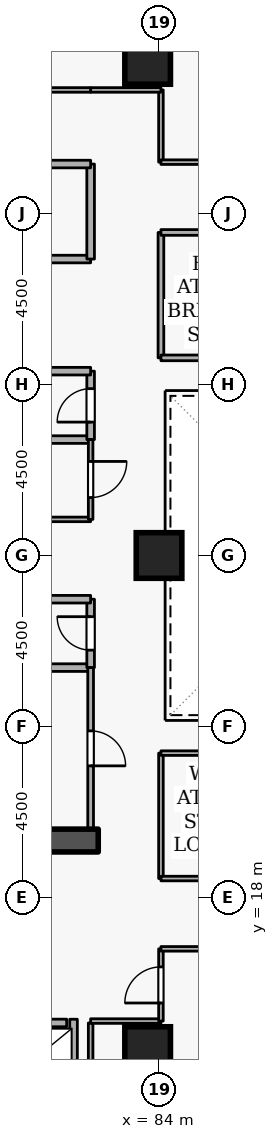
"""IFC4 building model, lengths in metres.
Left out: names, types, materials, properties, quantities, classifications, styles, units other than length and angle.
Written with IfcOpenShell. Run it as: python <this file> out.ifc"""

import sys

from ifc_helpers import new_model, si_unit, direction, frame, frame_2d, origin, origin_2d, place, context, subcontext, project, spatial, rectangle, extrude, element, fill, save


model = new_model("IFC4")
c1 = context("Model", 3, precision=1e-05, world=origin(), true_north=direction((0.0, 1.0)))
c2 = subcontext(c1, "Body", "Model", "MODEL_VIEW")
j1 = project(units=[si_unit("LENGTHUNIT", "METRE"), si_unit("PLANEANGLEUNIT", "RADIAN")], contexts=[c1])
p1 = place(None, origin())
s1 = spatial("IfcSite", under=j1, at=p1, CompositionType="ELEMENT")
p2 = place(p1, origin())
s2 = spatial("IfcBuilding", under=s1, at=p2, CompositionType="ELEMENT")
p3 = place(p2, frame((0.0, 0.0, 90.9)))
s3 = spatial("IfcBuildingStorey", under=s2, at=p3, CompositionType="ELEMENT", Elevation=90.9)
p4 = place(p3, frame((76.7, 19.5, 0.0), z_axis=(0.0, 0.0, 1.0), x_axis=(1.0, 0.0, 0.0)))
e1 = element("IfcWall", 1, at=p4, inside=s3, PredefinedType="SHEAR", context=c2, shape_type="SweptSolid", body=[
    extrude(rectangle(XDim=5.7, YDim=0.6, at=frame_2d((2.85, 0.0))), origin(), (0.0, 0.0, 1.0), 3.6),
])
for number, where, z_axis, x_axis in (
    (2, (83.7, 14.0, 0.0), (0.0, 0.0, 1.0), (1.0, 0.0, 0.0)),
    (3, (83.7, 40.0, 0.0), (0.0, 0.0, 1.0), (1.0, 0.0, 0.0)),
    (4, (84.0, 27.0, 0.0), (0.0, 0.0, 1.0), (1.0, 0.0, 0.0)),
):
    element("IfcColumn", number, at=place(p3, frame(where, z_axis=z_axis, x_axis=x_axis)), inside=s3, PredefinedType="COLUMN", context=c2, shape_type="SweptSolid", body=[
        extrude(rectangle(XDim=1.2, YDim=1.2, at=origin_2d()), origin(), (0.0, 0.0, 1.0), 3.6),
    ])
p5 = place(p3, frame((79.63, 14.7, 0.0), z_axis=(0.0, 0.0, 1.0), x_axis=(1.0, 0.0, 0.0)))
e5 = element("IfcWall", 5, at=p5, inside=s3, PredefinedType="STANDARD", context=c2, shape_type="SweptSolid", body=[
    extrude(rectangle(XDim=1.94, YDim=0.2, at=frame_2d((0.97, 0.0))), origin(), (0.0, 0.0, 1.0), 3.34),
])
p6 = place(p5, frame((0.46, 0.0, 0.0)))
e6 = element("IfcOpeningElement", 6, at=p6, cuts=e5, PredefinedType="OPENING", context=c2, shape_type="SweptSolid", body=[
    extrude(rectangle(XDim=1.02, YDim=2.06, at=frame_2d((0.51, 1.03))), frame((0.0, 0.11, 0.0), z_axis=(0.0, -1.0, 0.0), x_axis=(1.0, 0.0, 0.0)), (0.0, 0.0, 1.0), 0.22),
])
p7 = place(p3, frame((81.75, 12.612, 0.0), z_axis=(0.0, 0.0, 1.0), x_axis=(0.0, 1.0, 0.0)))
e7 = element("IfcWall", 7, at=p7, inside=s3, PredefinedType="STANDARD", context=c2, shape_type="SweptSolid", body=[
    extrude(rectangle(XDim=2.186, YDim=0.2, at=frame_2d((1.093, 0.0))), origin(), (0.0, 0.0, 1.0), 3.34),
])
p8 = place(p3, frame((79.9, 34.8, 0.0), z_axis=(0.0, 0.0, 1.0), x_axis=(1.0, 0.0, 0.0)))
e8 = element("IfcWall", 8, at=p8, inside=s3, PredefinedType="STANDARD", context=c2, shape_type="SweptSolid", body=[
    extrude(rectangle(XDim=2.3, YDim=0.2, at=frame_2d((1.15, 0.0))), origin(), (0.0, 0.0, 1.0), 2.545),
])
p9 = place(p3, frame((82.2, 34.8, 0.0), z_axis=(0.0, 0.0, 1.0), x_axis=(0.0, 1.0, 0.0)))
e9 = element("IfcWall", 9, at=p9, inside=s3, PredefinedType="STANDARD", context=c2, shape_type="SweptSolid", body=[
    extrude(rectangle(XDim=2.5, YDim=0.2, at=frame_2d((1.25, 0.0))), origin(), (0.0, 0.0, 1.0), 3.34),
])
p10 = place(p3, frame((82.2, 37.3, 0.0), z_axis=(0.0, 0.0, 1.0), x_axis=(-1.0, 0.0, 0.0)))
e10 = element("IfcWall", 10, at=p10, inside=s3, PredefinedType="STANDARD", context=c2, shape_type="SweptSolid", body=[
    extrude(rectangle(XDim=5.7, YDim=0.2, at=frame_2d((2.85, 0.0))), origin(), (0.0, 0.0, 1.0), 3.34),
])
p11 = place(p10, frame((2.275, 0.0, 0.0)))
e11 = element("IfcOpeningElement", 11, at=p11, cuts=e10, PredefinedType="OPENING", context=c2, shape_type="SweptSolid", body=[
    extrude(rectangle(XDim=1.15, YDim=2.1, at=frame_2d((0.575, 1.05))), frame((0.0, 0.11, 0.0), z_axis=(0.0, -1.0, 0.0), x_axis=(1.0, 0.0, 0.0)), (0.0, 0.0, 1.0), 0.22),
])
p12 = place(p3, frame((80.15, 24.05, 0.0), z_axis=(0.0, 0.0, 1.0), x_axis=(1.0, 0.0, 0.0)))
e12 = element("IfcWall", 12, at=p12, inside=s3, PredefinedType="STANDARD", context=c2, shape_type="SweptSolid", body=[
    extrude(rectangle(XDim=2.05, YDim=0.2, at=frame_2d((1.025, 0.0))), origin(), (0.0, 0.0, 1.0), 3.34),
])
p13 = place(p3, frame((82.2, 24.05, 0.0), z_axis=(0.0, 0.0, 1.0), x_axis=(0.0, 1.0, 0.0)))
e13 = element("IfcWall", 13, at=p13, inside=s3, PredefinedType="STANDARD", context=c2, shape_type="SweptSolid", body=[
    extrude(rectangle(XDim=1.8, YDim=0.2, at=frame_2d((0.9, 0.0))), origin(), (0.0, 0.0, 1.0), 3.34),
])
p14 = place(p13, frame((0.46, 0.0, 0.0)))
e14 = element("IfcOpeningElement", 14, at=p14, cuts=e13, PredefinedType="OPENING", context=c2, shape_type="SweptSolid", body=[
    extrude(rectangle(XDim=0.88, YDim=2.04, at=frame_2d((0.44, 1.02))), frame((0.0, 0.11, 0.0), z_axis=(0.0, -1.0, 0.0), x_axis=(1.0, 0.0, 0.0)), (0.0, 0.0, 1.0), 0.22),
])
for number, where, z_axis, x_axis in (
    (15, (82.2, 25.85, 0.0), (0.0, 0.0, 1.0), (-1.0, 0.0, 0.0)),
    (16, (80.15, 30.05, 0.0), (0.0, 0.0, 1.0), (1.0, 0.0, 0.0)),
):
    element("IfcWall", number, at=place(p3, frame(where, z_axis=z_axis, x_axis=x_axis)), inside=s3, PredefinedType="STANDARD", context=c2, shape_type="SweptSolid", body=[
        extrude(rectangle(XDim=2.05, YDim=0.2, at=frame_2d((1.025, 0.0))), origin(), (0.0, 0.0, 1.0), 3.34),
    ])
p15 = place(p3, frame((82.2, 30.05, 0.0), z_axis=(0.0, 0.0, 1.0), x_axis=(0.0, 1.0, 0.0)))
e17 = element("IfcWall", 17, at=p15, inside=s3, PredefinedType="STANDARD", context=c2, shape_type="SweptSolid", body=[
    extrude(rectangle(XDim=1.8, YDim=0.2, at=frame_2d((0.9, 0.0))), origin(), (0.0, 0.0, 1.0), 3.34),
])
p16 = place(p15, frame((0.46, 0.0, 0.0)))
e18 = element("IfcOpeningElement", 18, at=p16, cuts=e17, PredefinedType="OPENING", context=c2, shape_type="SweptSolid", body=[
    extrude(rectangle(XDim=0.88, YDim=2.04, at=frame_2d((0.44, 1.02))), frame((0.0, 0.11, 0.0), z_axis=(0.0, -1.0, 0.0), x_axis=(1.0, 0.0, 0.0)), (0.0, 0.0, 1.0), 0.22),
])
p17 = place(p3, frame((82.2, 31.85, 0.0), z_axis=(0.0, 0.0, 1.0), x_axis=(-1.0, 0.0, 0.0)))
e19 = element("IfcWall", 19, at=p17, inside=s3, PredefinedType="STANDARD", context=c2, shape_type="SweptSolid", body=[
    extrude(rectangle(XDim=2.05, YDim=0.2, at=frame_2d((1.025, 0.0))), origin(), (0.0, 0.0, 1.0), 3.34),
])
p18 = place(p3, frame((82.2, 24.05, 0.0), z_axis=(0.0, 0.0, 1.0), x_axis=(0.0, -1.0, 0.0)))
e20 = element("IfcWall", 20, at=p18, inside=s3, PredefinedType="PARTITIONING", context=c2, shape_type="SweptSolid", body=[
    extrude(rectangle(XDim=4.25, YDim=0.15, at=frame_2d((2.125, 0.0))), origin(), (0.0, 0.0, 1.0), 3.34),
])
p19 = place(p18, frame((1.665, 0.0, 0.0)))
e21 = element("IfcOpeningElement", 21, at=p19, cuts=e20, PredefinedType="OPENING", context=c2, shape_type="SweptSolid", body=[
    extrude(rectangle(XDim=0.92, YDim=2.08, at=frame_2d((0.46, 1.04))), frame((0.0, 0.085, 0.0), z_axis=(0.0, -1.0, 0.0), x_axis=(1.0, 0.0, 0.0)), (0.0, 0.0, 1.0), 0.17),
])
p20 = place(p3, frame((82.2, 27.95, 0.0), z_axis=(0.0, 0.0, 1.0), x_axis=(-1.0, 0.0, 0.0)))
e22 = element("IfcWall", 22, at=p20, inside=s3, PredefinedType="PARTITIONING", context=c2, shape_type="SweptSolid", body=[
    extrude(rectangle(XDim=2.05, YDim=0.12, at=frame_2d((1.025, 0.0))), origin(), (0.0, 0.0, 1.0), 3.34),
])
p21 = place(p3, frame((82.2, 30.05, 0.0), z_axis=(0.0, 0.0, 1.0), x_axis=(0.0, -1.0, 0.0)))
e23 = element("IfcWall", 23, at=p21, inside=s3, PredefinedType="PARTITIONING", context=c2, shape_type="SweptSolid", body=[
    extrude(rectangle(XDim=2.1, YDim=0.12, at=frame_2d((1.05, 0.0))), origin(), (0.0, 0.0, 1.0), 3.34),
])
p22 = place(p21, frame((0.575, 0.0, 0.0)))
e24 = element("IfcOpeningElement", 24, at=p22, cuts=e23, PredefinedType="OPENING", context=c2, shape_type="SweptSolid", body=[
    extrude(rectangle(XDim=0.95, YDim=2.1, at=frame_2d((0.475, 1.05))), frame((0.0, 0.07, 0.0), z_axis=(0.0, -1.0, 0.0), x_axis=(1.0, 0.0, 0.0)), (0.0, 0.0, 1.0), 0.14),
])
p23 = place(p3, frame((82.2, 12.4, 0.0), z_axis=(0.0, 0.0, 1.0), x_axis=(0.0, 1.0, 0.0)))
e25 = element("IfcWall", 25, at=p23, inside=s3, PredefinedType="PARTITIONING", context=c2, shape_type="SweptSolid", body=[
    extrude(rectangle(XDim=2.3, YDim=0.12, at=frame_2d((1.15, 0.0))), origin(), (0.0, 0.0, 1.0), 3.34),
])
p24 = place(p3, frame((82.2, 14.75, 0.0), z_axis=(0.0, 0.0, 1.0), x_axis=(1.0, 0.0, 0.0)))
e26 = element("IfcWall", 26, at=p24, inside=s3, PredefinedType="PARTITIONING", context=c2, shape_type="SweptSolid", body=[
    extrude(rectangle(XDim=1.85, YDim=0.12, at=frame_2d((0.925, 0.0))), origin(), (0.0, 0.0, 1.0), 3.34),
])
p25 = place(p3, frame((84.05, 14.75, 0.0), z_axis=(0.0, 0.0, 1.0), x_axis=(0.0, 1.0, 0.0)))
e27 = element("IfcWall", 27, at=p25, inside=s3, PredefinedType="PARTITIONING", context=c2, shape_type="SweptSolid", body=[
    extrude(rectangle(XDim=1.9, YDim=0.12, at=frame_2d((0.95, 0.0))), origin(), (0.0, 0.0, 1.0), 3.34),
])
p26 = place(p25, frame((0.475, 0.0, 0.0)))
e28 = element("IfcOpeningElement", 28, at=p26, cuts=e27, PredefinedType="OPENING", context=c2, shape_type="SweptSolid", body=[
    extrude(rectangle(XDim=0.95, YDim=2.1, at=frame_2d((0.475, 1.05))), frame((0.0, 0.07, 0.0), z_axis=(0.0, -1.0, 0.0), x_axis=(1.0, 0.0, 0.0)), (0.0, 0.0, 1.0), 0.14),
])
p27 = place(p3, frame((84.05, 16.65, 0.0), z_axis=(0.0, 0.0, 1.0), x_axis=(1.0, 0.0, 0.0)))
e29 = element("IfcWall", 29, at=p27, inside=s3, PredefinedType="PARTITIONING", context=c2, shape_type="SweptSolid", body=[
    extrude(rectangle(XDim=1.3, YDim=0.12, at=frame_2d((0.65, 0.0))), origin(), (0.0, 0.0, 1.0), 3.34),
])
p28 = place(p3, frame((84.05, 37.35, 0.0), z_axis=(0.0, 0.0, 1.0), x_axis=(0.0, 1.0, 0.0)))
e30 = element("IfcWall", 30, at=p28, inside=s3, PredefinedType="PARTITIONING", context=c2, shape_type="SweptSolid", body=[
    extrude(rectangle(XDim=1.9, YDim=0.12, at=frame_2d((0.95, 0.0))), origin(), (0.0, 0.0, 1.0), 3.34),
])
p29 = place(p3, frame((84.05, 39.25, 0.0), z_axis=(0.0, 0.0, 1.0), x_axis=(-1.0, 0.0, 0.0)))
e31 = element("IfcWall", 31, at=p29, inside=s3, PredefinedType="PARTITIONING", context=c2, shape_type="SweptSolid", body=[
    extrude(rectangle(XDim=1.85, YDim=0.12, at=frame_2d((0.925, 0.0))), origin(), (0.0, 0.0, 1.0), 3.34),
])
p30 = place(p3, frame((82.2, 39.25, 0.0), z_axis=(0.0, 0.0, 1.0), x_axis=(-1.0, 0.0, 0.0)))
e32 = element("IfcWall", 32, at=p30, inside=s3, PredefinedType="PARTITIONING", context=c2, shape_type="SweptSolid", body=[
    extrude(rectangle(XDim=9.35, YDim=0.12, at=frame_2d((4.675, 0.0))), origin(), (0.0, 0.0, 1.0), 3.34),
])
p31 = place(p30, frame((4.15, 0.0, 0.0)))
e33 = element("IfcOpeningElement", 33, at=p31, cuts=e32, PredefinedType="OPENING", context=c2, shape_type="SweptSolid", body=[
    extrude(rectangle(XDim=1.05, YDim=2.1, at=frame_2d((0.525, 1.05))), frame((0.0, 0.07, 0.0), z_axis=(0.0, -1.0, 0.0), x_axis=(1.0, 0.0, 0.0)), (0.0, 0.0, 1.0), 0.14),
])
p32 = place(p3, frame((85.35, 37.35, 0.0), z_axis=(0.0, 0.0, 1.0), x_axis=(-1.0, 0.0, 0.0)))
e34 = element("IfcWall", 34, at=p32, inside=s3, PredefinedType="PARTITIONING", context=c2, shape_type="SweptSolid", body=[
    extrude(rectangle(XDim=1.3, YDim=0.12, at=frame_2d((0.65, 0.0))), origin(), (0.0, 0.0, 1.0), 3.34),
])
p33 = place(p3, frame((84.05, 32.2, 0.0), z_axis=(0.0, 0.0, 1.0), x_axis=(0.0, 1.0, 0.0)))
e35 = element("IfcWall", 35, at=p33, inside=s3, PredefinedType="PARTITIONING", context=c2, shape_type="SweptSolid", body=[
    extrude(rectangle(XDim=3.3, YDim=0.15, at=frame_2d((1.65, 0.0))), origin(), (0.0, 0.0, 1.0), 3.34),
])
p34 = place(p3, frame((84.05, 35.5, 0.0), z_axis=(0.0, 0.0, 1.0), x_axis=(1.0, 0.0, 0.0)))
e36 = element("IfcWall", 36, at=p34, inside=s3, PredefinedType="PARTITIONING", context=c2, shape_type="SweptSolid", body=[
    extrude(rectangle(XDim=8.9, YDim=0.15, at=frame_2d((4.45, 0.0))), origin(), (0.0, 0.0, 1.0), 3.34),
])
p35 = place(p34, frame((3.8, 0.0, 0.0)))
e37 = element("IfcOpeningElement", 37, at=p35, cuts=e36, PredefinedType="OPENING", context=c2, shape_type="SweptSolid", body=[
    extrude(rectangle(XDim=1.3, YDim=2.12, at=frame_2d((0.65, 1.06))), frame((0.0, 0.085, 0.0), z_axis=(0.0, -1.0, 0.0), x_axis=(1.0, 0.0, 0.0)), (0.0, 0.0, 1.0), 0.17),
])
p36 = place(p3, frame((92.95, 32.2, 0.0), z_axis=(0.0, 0.0, 1.0), x_axis=(-1.0, 0.0, 0.0)))
e38 = element("IfcWall", 38, at=p36, inside=s3, PredefinedType="PARTITIONING", context=c2, shape_type="SweptSolid", body=[
    extrude(rectangle(XDim=8.9, YDim=0.15, at=frame_2d((4.45, 0.0))), origin(), (0.0, 0.0, 1.0), 3.34),
])
p37 = place(p3, frame((84.05, 18.5, 0.0), z_axis=(0.0, 0.0, 1.0), x_axis=(0.0, 1.0, 0.0)))
e39 = element("IfcWall", 39, at=p37, inside=s3, PredefinedType="PARTITIONING", context=c2, shape_type="SweptSolid", body=[
    extrude(rectangle(XDim=3.3, YDim=0.12, at=frame_2d((1.65, 0.0))), origin(), (0.0, 0.0, 1.0), 3.34),
])
p38 = place(p3, frame((84.05, 21.8, 0.0), z_axis=(0.0, 0.0, 1.0), x_axis=(1.0, 0.0, 0.0)))
e40 = element("IfcWall", 40, at=p38, inside=s3, PredefinedType="PARTITIONING", context=c2, shape_type="SweptSolid", body=[
    extrude(rectangle(XDim=8.9, YDim=0.12, at=frame_2d((4.45, 0.0))), origin(), (0.0, 0.0, 1.0), 3.34),
])
p39 = place(p3, frame((92.95, 18.5, 0.0), z_axis=(0.0, 0.0, 1.0), x_axis=(-1.0, 0.0, 0.0)))
e41 = element("IfcWall", 41, at=p39, inside=s3, PredefinedType="PARTITIONING", context=c2, shape_type="SweptSolid", body=[
    extrude(rectangle(XDim=8.9, YDim=0.12, at=frame_2d((4.45, 0.0))), origin(), (0.0, 0.0, 1.0), 3.34),
])
p40 = place(p39, frame((3.975, 0.0, 0.0)))
e42 = element("IfcOpeningElement", 42, at=p40, cuts=e41, PredefinedType="OPENING", context=c2, shape_type="SweptSolid", body=[
    extrude(rectangle(XDim=0.95, YDim=2.1, at=frame_2d((0.475, 1.05))), frame((0.0, 0.07, 0.0), z_axis=(0.0, -1.0, 0.0), x_axis=(1.0, 0.0, 0.0)), (0.0, 0.0, 1.0), 0.14),
])
p41 = place(p14, origin())
e43 = element("IfcDoor", 43, at=p41, inside=s3, OperationType="SINGLE_SWING_RIGHT", PredefinedType="DOOR", context=c2, shape_type="SweptSolid", body=[
    extrude(rectangle(XDim=0.88, YDim=2.04, at=frame_2d((0.44, 1.02))), frame((0.0, 0.025, 0.0), z_axis=(0.0, -1.0, 0.0), x_axis=(1.0, 0.0, 0.0)), (0.0, 0.0, 1.0), 0.05),
])
fill(e14, e43)
p42 = place(p16, origin())
e44 = element("IfcDoor", 44, at=p42, inside=s3, OperationType="SINGLE_SWING_LEFT", PredefinedType="DOOR", context=c2, shape_type="SweptSolid", body=[
    extrude(rectangle(XDim=0.88, YDim=2.04, at=frame_2d((0.44, 1.02))), frame((0.0, 0.025, 0.0), z_axis=(0.0, -1.0, 0.0), x_axis=(1.0, 0.0, 0.0)), (0.0, 0.0, 1.0), 0.05),
])
fill(e18, e44)
p43 = place(p19, origin())
e45 = element("IfcDoor", 45, at=p43, inside=s3, OperationType="SINGLE_SWING_RIGHT", PredefinedType="DOOR", context=c2, shape_type="SweptSolid", body=[
    extrude(rectangle(XDim=0.92, YDim=2.08, at=frame_2d((0.46, 1.04))), frame((0.0, 0.025, 0.0), z_axis=(0.0, -1.0, 0.0), x_axis=(1.0, 0.0, 0.0)), (0.0, 0.0, 1.0), 0.05),
])
fill(e21, e45)
p44 = place(p22, origin())
e46 = element("IfcDoor", 46, at=p44, inside=s3, OperationType="SINGLE_SWING_LEFT", PredefinedType="DOOR", context=c2, shape_type="SweptSolid", body=[
    extrude(rectangle(XDim=0.95, YDim=2.1, at=frame_2d((0.475, 1.05))), frame((0.0, 0.025, 0.0), z_axis=(0.0, -1.0, 0.0), x_axis=(1.0, 0.0, 0.0)), (0.0, 0.0, 1.0), 0.05),
])
fill(e24, e46)
p45 = place(p26, origin())
e47 = element("IfcDoor", 47, at=p45, inside=s3, OperationType="SINGLE_SWING_LEFT", PredefinedType="DOOR", context=c2, shape_type="SweptSolid", body=[
    extrude(rectangle(XDim=0.95, YDim=2.1, at=frame_2d((0.475, 1.05))), frame((0.0, 0.025, 0.0), z_axis=(0.0, -1.0, 0.0), x_axis=(1.0, 0.0, 0.0)), (0.0, 0.0, 1.0), 0.05),
])
fill(e28, e47)
save(model, sys.argv[1])
